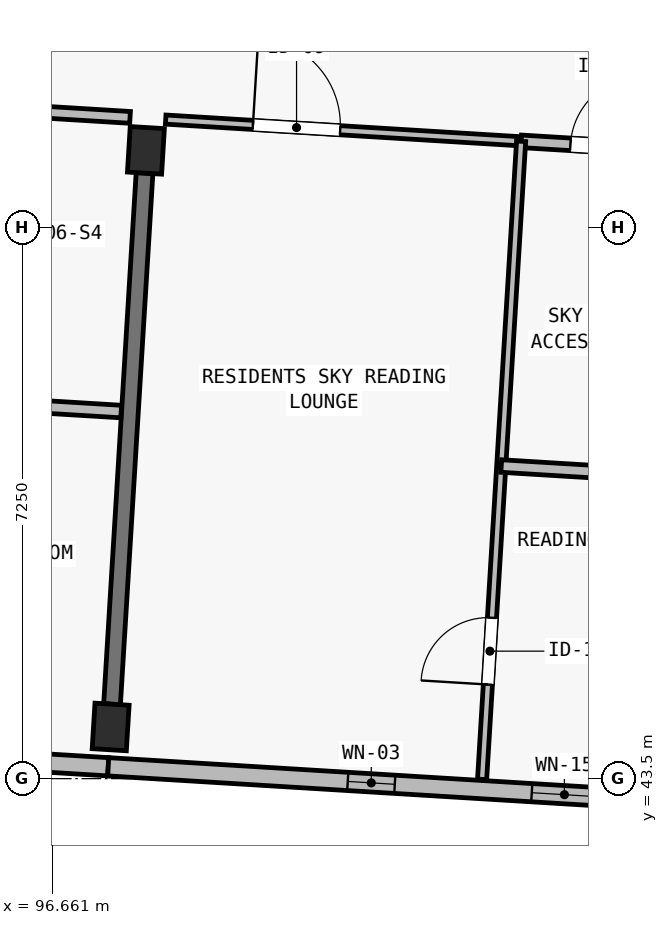
"""IFC4 building model, lengths in metres.
Left out: names, types, materials, properties, quantities, classifications, styles, units other than length and angle.
Written with IfcOpenShell. Run it as: python <this file> out.ifc"""

import sys

from ifc_helpers import new_model, si_unit, direction, frame, frame_2d, origin, origin_2d, place, context, subcontext, project, spatial, rectangle, extrude, element, fill, save


model = new_model("IFC4")
c1 = context("Model", 3, precision=1e-05, world=origin(), true_north=direction((0.0, 1.0)))
c2 = subcontext(c1, "Body", "Model", "MODEL_VIEW")
j1 = project(units=[si_unit("LENGTHUNIT", "METRE"), si_unit("PLANEANGLEUNIT", "RADIAN")], contexts=[c1])
p1 = place(None, origin())
s1 = spatial("IfcSite", under=j1, at=p1, CompositionType="ELEMENT")
p2 = place(p1, origin())
s2 = spatial("IfcBuilding", under=s1, at=p2, CompositionType="ELEMENT")
p3 = place(p2, frame((0.0, 0.0, 21.4)))
s3 = spatial("IfcBuildingStorey", under=s2, at=p3, CompositionType="ELEMENT", Elevation=21.4)
for number, where, z_axis, x_axis in (
    (1, (97.429, 44.18, 0.0), (0.0, 0.0, 1.0), (0.998, -0.061, 0.0)),
    (2, (97.893, 51.766, 0.0), (0.0, 0.0, 1.0), (0.998, -0.061, 0.0)),
):
    element("IfcColumn", number, at=place(p3, frame(where, z_axis=z_axis, x_axis=x_axis)), inside=s3, PredefinedType="COLUMN", context=c2, shape_type="SweptSolid", body=[
        extrude(rectangle(XDim=0.45, YDim=0.6, at=origin_2d()), origin(), (0.0, 0.0, 1.0), 3.25),
    ])
p4 = place(p3, frame((97.448, 44.479, 0.0), z_axis=(0.0, 0.0, 1.0), x_axis=(0.061034188237, 0.998135676081, 0.0)))
e3 = element("IfcWall", 3, at=p4, inside=s3, PredefinedType="SHEAR", context=c2, shape_type="SweptSolid", body=[
    extrude(rectangle(XDim=7.0, YDim=0.22, at=frame_2d((3.5, 0.0))), origin(), (0.0, 0.0, 1.0), 2.5),
])
p5 = place(p3, frame((97.397, 43.656, 0.0), z_axis=(0.0, 0.0, 1.0), x_axis=(-0.998135549572, 0.061036257095, 0.0)))
e4 = element("IfcWall", 4, at=p5, inside=s3, PredefinedType="SOLIDWALL", context=c2, shape_type="SweptSolid", body=[
    extrude(rectangle(XDim=7.6, YDim=0.24, at=frame_2d((3.8, 0.0))), origin(), (0.0, 0.0, 1.0), 3.0),
])
p6 = place(p5, frame((1.571, 0.0, 0.48)))
e5 = element("IfcOpeningElement", 5, at=p6, cuts=e4, PredefinedType="OPENING", context=c2, shape_type="SweptSolid", body=[
    extrude(rectangle(XDim=0.76, YDim=2.34, at=frame_2d((0.38, 1.17))), frame((0.0, 0.135, 0.0), z_axis=(0.0, -1.0, 0.0), x_axis=(1.0, 0.0, 0.0)), (0.0, 0.0, 1.0), 0.27),
])
p7 = place(p5, frame((4.848, 0.0, 0.48)))
e6 = element("IfcOpeningElement", 6, at=p7, cuts=e4, PredefinedType="OPENING", context=c2, shape_type="SweptSolid", body=[
    extrude(rectangle(XDim=0.82, YDim=2.18, at=frame_2d((0.41, 1.09))), frame((0.0, 0.135, 0.0), z_axis=(0.0, -1.0, 0.0), x_axis=(1.0, 0.0, 0.0)), (0.0, 0.0, 1.0), 0.27),
])
p8 = place(p5, frame((6.15, 0.0, 0.52)))
e7 = element("IfcOpeningElement", 7, at=p8, cuts=e4, PredefinedType="OPENING", context=c2, shape_type="SweptSolid", body=[
    extrude(rectangle(XDim=0.84, YDim=2.28, at=frame_2d((0.42, 1.14))), frame((0.0, 0.135, 0.0), z_axis=(0.0, -1.0, 0.0), x_axis=(1.0, 0.0, 0.0)), (0.0, 0.0, 1.0), 0.27),
])
p9 = place(p3, frame((105.507, 43.16, 0.0), z_axis=(0.0, 0.0, 1.0), x_axis=(-0.998134248939, 0.061057522844, 0.0)))
e8 = element("IfcWall", 8, at=p9, inside=s3, PredefinedType="SOLIDWALL", context=c2, shape_type="SweptSolid", body=[
    extrude(rectangle(XDim=8.125, YDim=0.24, at=frame_2d((4.062, 0.0))), origin(), (0.0, 0.0, 1.0), 3.0),
])
p10 = place(p9, frame((1.682, 0.0, 0.5)))
e9 = element("IfcOpeningElement", 9, at=p10, cuts=e8, PredefinedType="OPENING", context=c2, shape_type="SweptSolid", body=[
    extrude(rectangle(XDim=0.86, YDim=2.36, at=frame_2d((0.43, 1.18))), frame((0.0, 0.135, 0.0), z_axis=(0.0, -1.0, 0.0), x_axis=(1.0, 0.0, 0.0)), (0.0, 0.0, 1.0), 0.27),
])
p11 = place(p9, frame((4.347, 0.0, 0.52)))
e10 = element("IfcOpeningElement", 10, at=p11, cuts=e8, PredefinedType="OPENING", context=c2, shape_type="SweptSolid", body=[
    extrude(rectangle(XDim=0.62, YDim=2.28, at=frame_2d((0.31, 1.14))), frame((0.0, 0.135, 0.0), z_axis=(0.0, -1.0, 0.0), x_axis=(1.0, 0.0, 0.0)), (0.0, 0.0, 1.0), 0.27),
])
p12 = place(p3, frame((90.567, 52.635, 0.0), z_axis=(0.0, 0.0, 1.0), x_axis=(0.998134569689, -0.061052279168, 0.0)))
e11 = element("IfcWall", 11, at=p12, inside=s3, PredefinedType="PARTITIONING", context=c2, shape_type="SweptSolid", body=[
    extrude(rectangle(XDim=7.13, YDim=0.155, at=frame_2d((3.565, 0.0))), origin(), (0.0, 0.0, 1.0), 2.97),
])
p13 = place(p12, frame((1.355, 0.0, 0.0)))
e12 = element("IfcOpeningElement", 12, at=p13, cuts=e11, PredefinedType="OPENING", context=c2, shape_type="SweptSolid", body=[
    extrude(rectangle(XDim=0.98, YDim=2.15, at=frame_2d((0.49, 1.075))), frame((0.0, 0.093, 0.0), z_axis=(0.0, -1.0, 0.0), x_axis=(1.0, 0.0, 0.0)), (0.0, 0.0, 1.0), 0.185),
])
p14 = place(p3, frame((93.89, 48.554, 0.0), z_axis=(0.0, 0.0, 1.0), x_axis=(0.99813243538, -0.061087162657, 0.0)))
e13 = element("IfcWall", 13, at=p14, inside=s3, PredefinedType="PLUMBINGWALL", context=c2, shape_type="SweptSolid", body=[
    extrude(rectangle(XDim=3.685, YDim=0.165, at=frame_2d((1.842, 0.0))), origin(), (0.0, 0.0, 1.0), 2.97),
])
p15 = place(p14, frame((1.3, 0.0, 0.0)))
e14 = element("IfcOpeningElement", 14, at=p15, cuts=e13, PredefinedType="OPENING", context=c2, shape_type="SweptSolid", body=[
    extrude(rectangle(XDim=0.82, YDim=2.08, at=frame_2d((0.41, 1.04))), frame((0.0, 0.097, 0.0), z_axis=(0.0, -1.0, 0.0), x_axis=(1.0, 0.0, 0.0)), (0.0, 0.0, 1.0), 0.195),
])
p16 = place(p3, frame((98.153, 52.171, 0.0), z_axis=(0.0, 0.0, 1.0), x_axis=(0.998133238441, -0.06107403965, 0.0)))
e15 = element("IfcWall", 15, at=p16, inside=s3, PredefinedType="PARTITIONING", context=c2, shape_type="SweptSolid", body=[
    extrude(rectangle(XDim=4.685, YDim=0.12, at=frame_2d((2.343, 0.0))), origin(), (0.0, 0.0, 1.0), 2.97),
])
p17 = place(p16, frame((1.15, 0.0, 0.0)))
e16 = element("IfcOpeningElement", 16, at=p17, cuts=e15, PredefinedType="OPENING", context=c2, shape_type="SweptSolid", body=[
    extrude(rectangle(XDim=1.15, YDim=2.15, at=frame_2d((0.575, 1.075))), frame((0.0, 0.075, 0.0), z_axis=(0.0, -1.0, 0.0), x_axis=(1.0, 0.0, 0.0)), (0.0, 0.0, 1.0), 0.15),
])
p18 = place(p3, frame((102.83, 51.885, 0.0), z_axis=(0.0, 0.0, 1.0), x_axis=(0.998134491017, -0.061053565351, 0.0)))
e17 = element("IfcWall", 17, at=p18, inside=s3, PredefinedType="PLUMBINGWALL", context=c2, shape_type="SweptSolid", body=[
    extrude(rectangle(XDim=3.075, YDim=0.165, at=frame_2d((1.538, 0.0))), origin(), (0.0, 0.0, 1.0), 2.97),
])
p19 = place(p18, frame((0.65, 0.0, 0.0)))
e18 = element("IfcOpeningElement", 18, at=p19, cuts=e17, PredefinedType="OPENING", context=c2, shape_type="SweptSolid", body=[
    extrude(rectangle(XDim=0.96, YDim=2.12, at=frame_2d((0.48, 1.06))), frame((0.0, 0.097, 0.0), z_axis=(0.0, -1.0, 0.0), x_axis=(1.0, 0.0, 0.0)), (0.0, 0.0, 1.0), 0.195),
])
p20 = place(p3, frame((102.316, 43.49, 0.0), z_axis=(0.0, 0.0, 1.0), x_axis=(0.061049859271, 0.998134717702, 0.0)))
e19 = element("IfcWall", 19, at=p20, inside=s3, PredefinedType="PARTITIONING", context=c2, shape_type="SweptSolid", body=[
    extrude(rectangle(XDim=8.41, YDim=0.12, at=frame_2d((4.205, 0.0))), origin(), (0.0, 0.0, 1.0), 2.97),
])
p21 = place(p20, frame((1.25, 0.0, 0.0)))
e20 = element("IfcOpeningElement", 20, at=p21, cuts=e19, PredefinedType="OPENING", context=c2, shape_type="SweptSolid", body=[
    extrude(rectangle(XDim=0.88, YDim=2.1, at=frame_2d((0.44, 1.05))), frame((0.0, 0.075, 0.0), z_axis=(0.0, -1.0, 0.0), x_axis=(1.0, 0.0, 0.0)), (0.0, 0.0, 1.0), 0.15),
])
p22 = place(p3, frame((102.568, 47.613, 0.0), z_axis=(0.0, 0.0, 1.0), x_axis=(0.99813419504, -0.061058403944, 0.0)))
e21 = element("IfcWall", 21, at=p22, inside=s3, PredefinedType="PLUMBINGWALL", context=c2, shape_type="SweptSolid", body=[
    extrude(rectangle(XDim=3.075, YDim=0.165, at=frame_2d((1.537, 0.0))), origin(), (0.0, 0.0, 1.0), 2.97),
])
p23 = place(p10, origin())
e22 = element("IfcWindow", 22, at=p23, inside=s3, PartitioningType="SINGLE_PANEL", PredefinedType="WINDOW", context=c2, shape_type="SweptSolid", body=[
    extrude(rectangle(XDim=0.86, YDim=2.36, at=frame_2d((0.43, 1.18))), frame((0.0, 0.03, 0.0), z_axis=(0.0, -1.0, 0.0), x_axis=(1.0, 0.0, 0.0)), (0.0, 0.0, 1.0), 0.06),
])
fill(e9, e22)
p24 = place(p11, origin())
e23 = element("IfcWindow", 23, at=p24, inside=s3, PartitioningType="SINGLE_PANEL", PredefinedType="WINDOW", context=c2, shape_type="SweptSolid", body=[
    extrude(rectangle(XDim=0.62, YDim=2.28, at=frame_2d((0.31, 1.14))), frame((0.0, 0.03, 0.0), z_axis=(0.0, -1.0, 0.0), x_axis=(1.0, 0.0, 0.0)), (0.0, 0.0, 1.0), 0.06),
])
fill(e10, e23)
p25 = place(p17, origin())
e24 = element("IfcDoor", 24, at=p25, inside=s3, OperationType="SINGLE_SWING_LEFT", PredefinedType="DOOR", context=c2, shape_type="SweptSolid", body=[
    extrude(rectangle(XDim=1.15, YDim=2.15, at=frame_2d((0.575, 1.075))), frame((0.0, 0.025, 0.0), z_axis=(0.0, -1.0, 0.0), x_axis=(1.0, 0.0, 0.0)), (0.0, 0.0, 1.0), 0.05),
])
fill(e16, e24)
p26 = place(p19, origin())
e25 = element("IfcDoor", 25, at=p26, inside=s3, OperationType="SINGLE_SWING_RIGHT", PredefinedType="DOOR", context=c2, shape_type="SweptSolid", body=[
    extrude(rectangle(XDim=0.96, YDim=2.12, at=frame_2d((0.48, 1.06))), frame((0.0, 0.025, 0.0), z_axis=(0.0, -1.0, 0.0), x_axis=(1.0, 0.0, 0.0)), (0.0, 0.0, 1.0), 0.05),
])
fill(e18, e25)
p27 = place(p21, origin())
e26 = element("IfcDoor", 26, at=p27, inside=s3, OperationType="SINGLE_SWING_LEFT", PredefinedType="DOOR", context=c2, shape_type="SweptSolid", body=[
    extrude(rectangle(XDim=0.88, YDim=2.1, at=frame_2d((0.44, 1.05))), frame((0.0, 0.025, 0.0), z_axis=(0.0, -1.0, 0.0), x_axis=(1.0, 0.0, 0.0)), (0.0, 0.0, 1.0), 0.05),
])
fill(e20, e26)
save(model, sys.argv[1])
